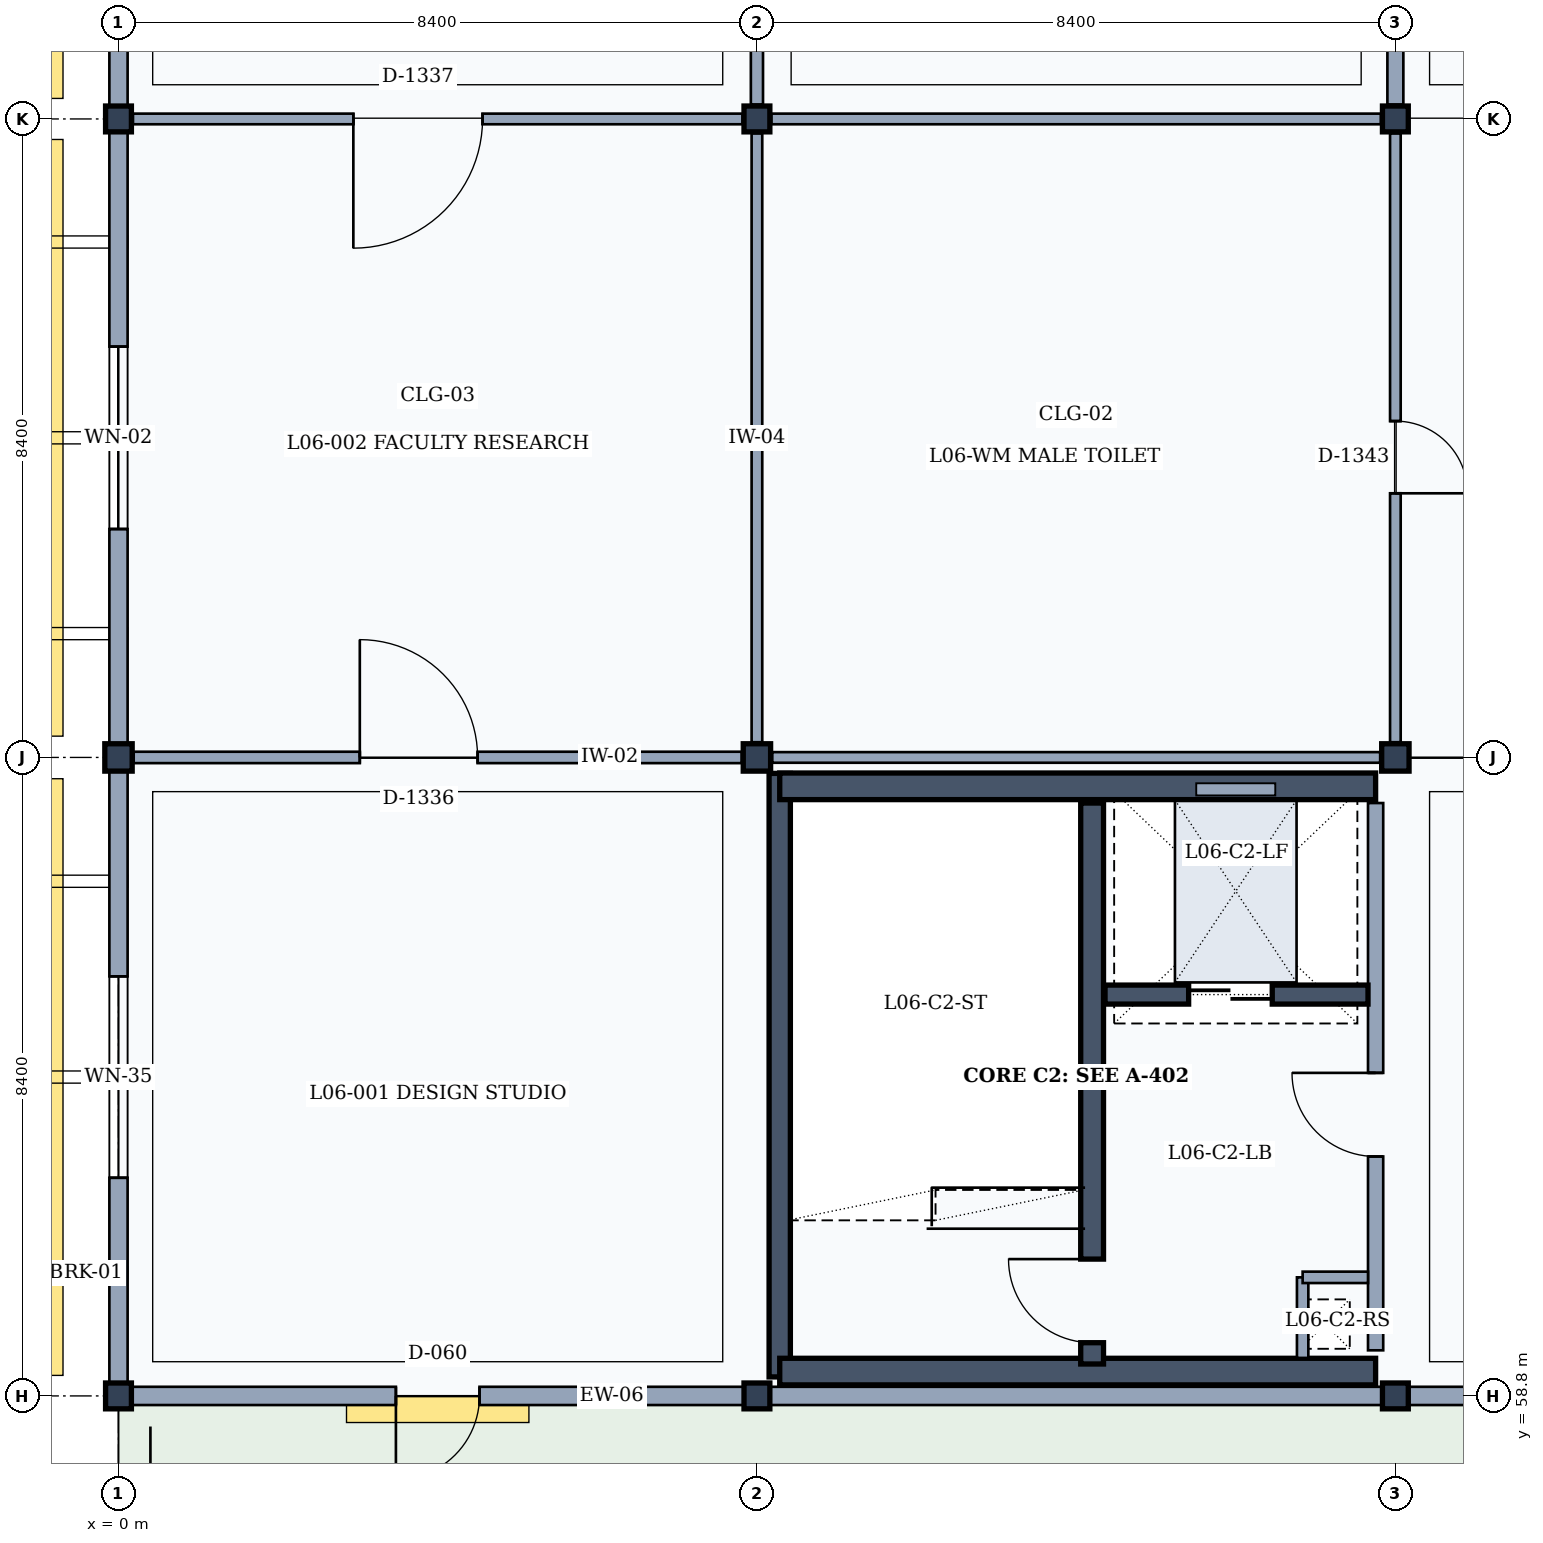
"""IFC4 building model, lengths in metres.
Left out: names, types, materials, properties, quantities, classifications, styles, units other than length and angle.
Written with IfcOpenShell. Run it as: python <this file> out.ifc"""

import sys

from ifc_helpers import new_model, si_unit, direction, frame, frame_2d, origin, origin_2d, place, context, subcontext, project, spatial, rectangle, extrude, element, fill, save


model = new_model("IFC4")
c1 = context("Model", 3, precision=1e-05, world=origin(), true_north=direction((0.0, 1.0)))
c2 = subcontext(c1, "Body", "Model", "MODEL_VIEW")
j1 = project(units=[si_unit("LENGTHUNIT", "METRE"), si_unit("PLANEANGLEUNIT", "RADIAN")], contexts=[c1])
p1 = place(None, origin())
s1 = spatial("IfcSite", under=j1, at=p1, CompositionType="ELEMENT")
p2 = place(p1, origin())
s2 = spatial("IfcBuilding", under=s1, at=p2, CompositionType="ELEMENT")
p3 = place(p2, frame((0.0, 0.0, 26.4)))
s3 = spatial("IfcBuildingStorey", under=s2, at=p3, CompositionType="ELEMENT", Elevation=26.4)
p4 = place(p3, frame((0.0, 58.8, 0.0), z_axis=(0.0, 0.0, 1.0), x_axis=(1.0, 0.0, 0.0)))
e1 = element("IfcColumn", 1, at=p4, inside=s3, PredefinedType="COLUMN", context=c2, shape_type="SweptSolid", body=[
    extrude(rectangle(XDim=0.34, YDim=0.34, at=origin_2d()), origin(), (0.0, 0.0, 1.0), 4.2),
])
p5 = place(p3, frame((0.0, 67.2, 0.0), z_axis=(0.0, 0.0, 1.0), x_axis=(1.0, 0.0, 0.0)))
e2 = element("IfcColumn", 2, at=p5, inside=s3, PredefinedType="COLUMN", context=c2, shape_type="SweptSolid", body=[
    extrude(rectangle(XDim=0.36, YDim=0.36, at=origin_2d()), origin(), (0.0, 0.0, 1.0), 4.2),
])
for number, where, z_axis, x_axis in (
    (3, (0.0, 75.6, 0.0), (0.0, 0.0, 1.0), (1.0, 0.0, 0.0)),
    (4, (8.4, 58.8, 0.0), (0.0, 0.0, 1.0), (1.0, 0.0, 0.0)),
):
    element("IfcColumn", number, at=place(p3, frame(where, z_axis=z_axis, x_axis=x_axis)), inside=s3, PredefinedType="COLUMN", context=c2, shape_type="SweptSolid", body=[
        extrude(rectangle(XDim=0.34, YDim=0.34, at=origin_2d()), origin(), (0.0, 0.0, 1.0), 4.2),
    ])
p6 = place(p3, frame((8.4, 67.2, 0.0), z_axis=(0.0, 0.0, 1.0), x_axis=(1.0, 0.0, 0.0)))
e5 = element("IfcColumn", 5, at=p6, inside=s3, PredefinedType="COLUMN", context=c2, shape_type="SweptSolid", body=[
    extrude(rectangle(XDim=0.36, YDim=0.36, at=origin_2d()), origin(), (0.0, 0.0, 1.0), 4.2),
])
for number, where, z_axis, x_axis in (
    (6, (8.4, 75.6, 0.0), (0.0, 0.0, 1.0), (1.0, 0.0, 0.0)),
    (7, (16.8, 58.8, 0.0), (0.0, 0.0, 1.0), (1.0, 0.0, 0.0)),
):
    element("IfcColumn", number, at=place(p3, frame(where, z_axis=z_axis, x_axis=x_axis)), inside=s3, PredefinedType="COLUMN", context=c2, shape_type="SweptSolid", body=[
        extrude(rectangle(XDim=0.34, YDim=0.34, at=origin_2d()), origin(), (0.0, 0.0, 1.0), 4.2),
    ])
p7 = place(p3, frame((16.8, 67.2, 0.0), z_axis=(0.0, 0.0, 1.0), x_axis=(1.0, 0.0, 0.0)))
e8 = element("IfcColumn", 8, at=p7, inside=s3, PredefinedType="COLUMN", context=c2, shape_type="SweptSolid", body=[
    extrude(rectangle(XDim=0.36, YDim=0.36, at=origin_2d()), origin(), (0.0, 0.0, 1.0), 4.2),
])
p8 = place(p3, frame((16.8, 75.6, 0.0), z_axis=(0.0, 0.0, 1.0), x_axis=(1.0, 0.0, 0.0)))
e9 = element("IfcColumn", 9, at=p8, inside=s3, PredefinedType="COLUMN", context=c2, shape_type="SweptSolid", body=[
    extrude(rectangle(XDim=0.34, YDim=0.34, at=origin_2d()), origin(), (0.0, 0.0, 1.0), 4.2),
])
p9 = place(p3, frame((8.23, 58.8, 0.0), z_axis=(0.0, 0.0, 1.0), x_axis=(-1.0, 0.0, 0.0)))
e10 = element("IfcWall", 10, at=p9, inside=s3, PredefinedType="SOLIDWALL", context=c2, shape_type="SweptSolid", body=[
    extrude(rectangle(XDim=8.06, YDim=0.24, at=frame_2d((4.03, 0.0))), origin(), (0.0, 0.0, 1.0), 3.36),
])
p10 = place(p9, frame((3.48, 0.0, 0.0)))
e11 = element("IfcOpeningElement", 11, at=p10, cuts=e10, PredefinedType="OPENING", context=c2, shape_type="SweptSolid", body=[
    extrude(rectangle(XDim=1.1, YDim=2.2, at=frame_2d((0.55, 1.1))), frame((0.0, 0.13, 0.0), z_axis=(0.0, -1.0, 0.0), x_axis=(1.0, 0.0, 0.0)), (0.0, 0.0, 1.0), 0.26),
])
p11 = place(p3, frame((0.0, 58.97, 0.0), z_axis=(0.0, 0.0, 1.0), x_axis=(0.0, 1.0, 0.0)))
e12 = element("IfcWall", 12, at=p11, inside=s3, PredefinedType="SOLIDWALL", context=c2, shape_type="SweptSolid", body=[
    extrude(rectangle(XDim=8.05, YDim=0.24, at=frame_2d((4.025, 0.0))), origin(), (0.0, 0.0, 1.0), 3.36),
])
p12 = place(p11, frame((2.7, 0.0, 0.9)))
e13 = element("IfcOpeningElement", 13, at=p12, cuts=e12, PredefinedType="OPENING", context=c2, shape_type="SweptSolid", body=[
    extrude(rectangle(XDim=2.65, YDim=1.8, at=frame_2d((1.325, 0.9))), frame((0.0, 0.13, 0.0), z_axis=(0.0, -1.0, 0.0), x_axis=(1.0, 0.0, 0.0)), (0.0, 0.0, 1.0), 0.26),
])
p13 = place(p3, frame((0.0, 67.38, 0.0), z_axis=(0.0, 0.0, 1.0), x_axis=(0.0, 1.0, 0.0)))
e14 = element("IfcWall", 14, at=p13, inside=s3, PredefinedType="SOLIDWALL", context=c2, shape_type="SweptSolid", body=[
    extrude(rectangle(XDim=8.05, YDim=0.24, at=frame_2d((4.025, 0.0))), origin(), (0.0, 0.0, 1.0), 3.36),
])
p14 = place(p13, frame((2.825, 0.0, 0.9)))
e15 = element("IfcOpeningElement", 15, at=p14, cuts=e14, PredefinedType="OPENING", context=c2, shape_type="SweptSolid", body=[
    extrude(rectangle(XDim=2.4, YDim=1.8, at=frame_2d((1.2, 0.9))), frame((0.0, 0.13, 0.0), z_axis=(0.0, -1.0, 0.0), x_axis=(1.0, 0.0, 0.0)), (0.0, 0.0, 1.0), 0.26),
])
p15 = place(p3, frame((0.0, 75.77, 0.0), z_axis=(0.0, 0.0, 1.0), x_axis=(0.0, 1.0, 0.0)))
e16 = element("IfcWall", 16, at=p15, inside=s3, PredefinedType="SOLIDWALL", context=c2, shape_type="SweptSolid", body=[
    extrude(rectangle(XDim=8.05, YDim=0.24, at=frame_2d((4.025, 0.0))), origin(), (0.0, 0.0, 1.0), 3.36),
])
p16 = place(p15, frame((3.125, 0.0, 0.9)))
e17 = element("IfcOpeningElement", 17, at=p16, cuts=e16, PredefinedType="OPENING", context=c2, shape_type="SweptSolid", body=[
    extrude(rectangle(XDim=1.8, YDim=1.5, at=frame_2d((0.9, 0.75))), frame((0.0, 0.13, 0.0), z_axis=(0.0, -1.0, 0.0), x_axis=(1.0, 0.0, 0.0)), (0.0, 0.0, 1.0), 0.26),
])
p17 = place(p3, frame((16.63, 58.8, 0.0), z_axis=(0.0, 0.0, 1.0), x_axis=(-1.0, 0.0, 0.0)))
e18 = element("IfcWall", 18, at=p17, inside=s3, PredefinedType="SOLIDWALL", context=c2, shape_type="SweptSolid", body=[
    extrude(rectangle(XDim=8.06, YDim=0.24, at=frame_2d((4.03, 0.0))), origin(), (0.0, 0.0, 1.0), 3.36),
])
p18 = place(p3, frame((25.03, 58.8, 0.0), z_axis=(0.0, 0.0, 1.0), x_axis=(-1.0, 0.0, 0.0)))
e19 = element("IfcWall", 19, at=p18, inside=s3, PredefinedType="SOLIDWALL", context=c2, shape_type="SweptSolid", body=[
    extrude(rectangle(XDim=8.06, YDim=0.24, at=frame_2d((4.03, 0.0))), origin(), (0.0, 0.0, 1.0), 3.36),
])
p19 = place(p18, frame((3.48, 0.0, 0.0)))
e20 = element("IfcOpeningElement", 20, at=p19, cuts=e19, PredefinedType="OPENING", context=c2, shape_type="SweptSolid", body=[
    extrude(rectangle(XDim=1.1, YDim=2.2, at=frame_2d((0.55, 1.1))), frame((0.0, 0.13, 0.0), z_axis=(0.0, -1.0, 0.0), x_axis=(1.0, 0.0, 0.0)), (0.0, 0.0, 1.0), 0.26),
])
p20 = place(p3, frame((8.7, 59.05, 0.0), z_axis=(0.0, 0.0, 1.0), x_axis=(0.0, 1.0, 0.0)))
e21 = element("IfcWall", 21, at=p20, inside=s3, PredefinedType="SHEAR", context=c2, shape_type="SweptSolid", body=[
    extrude(rectangle(XDim=7.94, YDim=0.28, at=frame_2d((3.97, 0.0))), origin(), (0.0, 0.0, 1.0), 3.99),
])
p21 = place(p3, frame((8.7, 66.82, 0.0), z_axis=(0.0, 0.0, 1.0), x_axis=(1.0, 0.0, 0.0)))
e22 = element("IfcWall", 22, at=p21, inside=s3, PredefinedType="SHEAR", context=c2, shape_type="SweptSolid", body=[
    extrude(rectangle(XDim=7.84, YDim=0.35, at=frame_2d((3.92, 0.0))), origin(), (0.0, 0.0, 1.0), 3.99),
])
p22 = place(p3, frame((16.54, 66.6, 0.0), z_axis=(0.0, 0.0, 1.0), x_axis=(0.0, -1.0, 0.0)))
e23 = element("IfcWall", 23, at=p22, inside=s3, PredefinedType="PARTITIONING", context=c2, shape_type="SweptSolid", body=[
    extrude(rectangle(XDim=7.2, YDim=0.2, at=frame_2d((3.6, 0.0))), origin(), (0.0, 0.0, 1.0), 3.32),
])
p23 = place(p22, frame((3.55, 0.0, 0.0)))
e24 = element("IfcOpeningElement", 24, at=p23, cuts=e23, PredefinedType="OPENING", context=c2, shape_type="SweptSolid", body=[
    extrude(rectangle(XDim=1.1, YDim=2.15, at=frame_2d((0.55, 1.075))), frame((0.0, 0.11, 0.0), z_axis=(0.0, -1.0, 0.0), x_axis=(1.0, 0.0, 0.0)), (0.0, 0.0, 1.0), 0.22),
])
p24 = place(p3, frame((16.54, 59.12, 0.0), z_axis=(0.0, 0.0, 1.0), x_axis=(-1.0, 0.0, 0.0)))
e25 = element("IfcWall", 25, at=p24, inside=s3, PredefinedType="SHEAR", context=c2, shape_type="SweptSolid", body=[
    extrude(rectangle(XDim=7.84, YDim=0.35, at=frame_2d((3.92, 0.0))), origin(), (0.0, 0.0, 1.0), 3.99),
])
p25 = place(p3, frame((12.81, 59.22, 0.0), z_axis=(0.0, 0.0, 1.0), x_axis=(0.0, 1.0, 0.0)))
e26 = element("IfcWall", 26, at=p25, inside=s3, PredefinedType="SHEAR", context=c2, shape_type="SweptSolid", body=[
    extrude(rectangle(XDim=7.38, YDim=0.3, at=frame_2d((3.69, 0.0))), origin(), (0.0, 0.0, 1.0), 3.99),
])
p26 = place(p25, frame((0.28, 0.0, 0.0)))
e27 = element("IfcOpeningElement", 27, at=p26, cuts=e26, PredefinedType="OPENING", context=c2, shape_type="SweptSolid", body=[
    extrude(rectangle(XDim=1.1, YDim=2.15, at=frame_2d((0.55, 1.075))), frame((0.0, 0.16, 0.0), z_axis=(0.0, -1.0, 0.0), x_axis=(1.0, 0.0, 0.0)), (0.0, 0.0, 1.0), 0.32),
])
p27 = place(p3, frame((15.58, 60.36, 0.0), z_axis=(0.0, 0.0, 1.0), x_axis=(0.0, -1.0, 0.0)))
e28 = element("IfcWall", 28, at=p27, inside=s3, PredefinedType="PARTITIONING", context=c2, shape_type="SweptSolid", body=[
    extrude(rectangle(XDim=1.06, YDim=0.15, at=frame_2d((0.53, 0.0))), origin(), (0.0, 0.0, 1.0), 3.32),
])
p28 = place(p3, frame((15.58, 60.36, 0.0), z_axis=(0.0, 0.0, 1.0), x_axis=(1.0, 0.0, 0.0)))
e29 = element("IfcWall", 29, at=p28, inside=s3, PredefinedType="PARTITIONING", context=c2, shape_type="SweptSolid", body=[
    extrude(rectangle(XDim=0.86, YDim=0.15, at=frame_2d((0.43, 0.0))), origin(), (0.0, 0.0, 1.0), 3.32),
])
p29 = place(p3, frame((12.98, 64.08, 0.0), z_axis=(0.0, 0.0, 1.0), x_axis=(1.0, 0.0, 0.0)))
e30 = element("IfcWall", 30, at=p29, inside=s3, PredefinedType="SHEAR", context=c2, shape_type="SweptSolid", body=[
    extrude(rectangle(XDim=3.46, YDim=0.25, at=frame_2d((1.73, 0.0))), origin(), (0.0, 0.0, 1.0), 3.99),
])
p30 = place(p29, frame((1.1, 0.0, 0.0)))
e31 = element("IfcOpeningElement", 31, at=p30, cuts=e30, PredefinedType="OPENING", context=c2, shape_type="SweptSolid", body=[
    extrude(rectangle(XDim=1.1, YDim=2.15, at=frame_2d((0.55, 1.075))), frame((0.0, 0.135, 0.0), z_axis=(0.0, -1.0, 0.0), x_axis=(1.0, 0.0, 0.0)), (0.0, 0.0, 1.0), 0.27),
])
p31 = place(p3, frame((0.2, 67.2, 0.0), z_axis=(0.0, 0.0, 1.0), x_axis=(1.0, 0.0, 0.0)))
e32 = element("IfcWall", 32, at=p31, inside=s3, PredefinedType="PARTITIONING", context=c2, shape_type="SweptSolid", body=[
    extrude(rectangle(XDim=8.0, YDim=0.15, at=frame_2d((4.0, 0.0))), origin(), (0.0, 0.0, 1.0), 3.32),
])
p32 = place(p31, frame((2.975, 0.0, 0.0)))
e33 = element("IfcOpeningElement", 33, at=p32, cuts=e32, PredefinedType="OPENING", context=c2, shape_type="SweptSolid", body=[
    extrude(rectangle(XDim=1.55, YDim=2.35, at=frame_2d((0.775, 1.175))), frame((0.0, 0.085, 0.0), z_axis=(0.0, -1.0, 0.0), x_axis=(1.0, 0.0, 0.0)), (0.0, 0.0, 1.0), 0.17),
])
p33 = place(p3, frame((8.4, 67.4, 0.0), z_axis=(0.0, 0.0, 1.0), x_axis=(0.0, 1.0, 0.0)))
e34 = element("IfcWall", 34, at=p33, inside=s3, PredefinedType="PARTITIONING", context=c2, shape_type="SweptSolid", body=[
    extrude(rectangle(XDim=8.01, YDim=0.14, at=frame_2d((4.005, 0.0))), origin(), (0.0, 0.0, 1.0), 3.32),
])
p34 = place(p3, frame((0.19, 75.6, 0.0), z_axis=(0.0, 0.0, 1.0), x_axis=(1.0, 0.0, 0.0)))
e35 = element("IfcWall", 35, at=p34, inside=s3, PredefinedType="PARTITIONING", context=c2, shape_type="SweptSolid", body=[
    extrude(rectangle(XDim=8.02, YDim=0.14, at=frame_2d((4.01, 0.0))), origin(), (0.0, 0.0, 1.0), 3.32),
])
p35 = place(p34, frame((2.9, 0.0, 0.0)))
e36 = element("IfcOpeningElement", 36, at=p35, cuts=e35, PredefinedType="OPENING", context=c2, shape_type="SweptSolid", body=[
    extrude(rectangle(XDim=1.7, YDim=2.3, at=frame_2d((0.85, 1.15))), frame((0.0, 0.08, 0.0), z_axis=(0.0, -1.0, 0.0), x_axis=(1.0, 0.0, 0.0)), (0.0, 0.0, 1.0), 0.16),
])
p36 = place(p3, frame((8.4, 75.79, 0.0), z_axis=(0.0, 0.0, 1.0), x_axis=(0.0, 1.0, 0.0)))
e37 = element("IfcWall", 37, at=p36, inside=s3, PredefinedType="PARTITIONING", context=c2, shape_type="SweptSolid", body=[
    extrude(rectangle(XDim=8.01, YDim=0.16, at=frame_2d((4.005, 0.0))), origin(), (0.0, 0.0, 1.0), 3.32),
])
p37 = place(p36, frame((2.8, 0.0, 0.0)))
e38 = element("IfcOpeningElement", 38, at=p37, cuts=e37, PredefinedType="OPENING", context=c2, shape_type="SweptSolid", body=[
    extrude(rectangle(XDim=1.9, YDim=2.4, at=frame_2d((0.95, 1.2))), frame((0.0, 0.09, 0.0), z_axis=(0.0, -1.0, 0.0), x_axis=(1.0, 0.0, 0.0)), (0.0, 0.0, 1.0), 0.18),
])
p38 = place(p3, frame((8.6, 67.2, 0.0), z_axis=(0.0, 0.0, 1.0), x_axis=(1.0, 0.0, 0.0)))
e39 = element("IfcWall", 39, at=p38, inside=s3, PredefinedType="PARTITIONING", context=c2, shape_type="SweptSolid", body=[
    extrude(rectangle(XDim=8.0, YDim=0.14, at=frame_2d((4.0, 0.0))), origin(), (0.0, 0.0, 1.0), 3.32),
])
p39 = place(p3, frame((16.8, 67.4, 0.0), z_axis=(0.0, 0.0, 1.0), x_axis=(0.0, 1.0, 0.0)))
e40 = element("IfcWall", 40, at=p39, inside=s3, PredefinedType="PARTITIONING", context=c2, shape_type="SweptSolid", body=[
    extrude(rectangle(XDim=8.01, YDim=0.14, at=frame_2d((4.005, 0.0))), origin(), (0.0, 0.0, 1.0), 3.32),
])
p40 = place(p39, frame((3.275, 0.0, 0.0)))
e41 = element("IfcOpeningElement", 41, at=p40, cuts=e40, PredefinedType="OPENING", context=c2, shape_type="SweptSolid", body=[
    extrude(rectangle(XDim=0.95, YDim=2.15, at=frame_2d((0.475, 1.075))), frame((0.0, 0.08, 0.0), z_axis=(0.0, -1.0, 0.0), x_axis=(1.0, 0.0, 0.0)), (0.0, 0.0, 1.0), 0.16),
])
p41 = place(p3, frame((8.59, 75.6, 0.0), z_axis=(0.0, 0.0, 1.0), x_axis=(1.0, 0.0, 0.0)))
e42 = element("IfcWall", 42, at=p41, inside=s3, PredefinedType="PARTITIONING", context=c2, shape_type="SweptSolid", body=[
    extrude(rectangle(XDim=8.02, YDim=0.14, at=frame_2d((4.01, 0.0))), origin(), (0.0, 0.0, 1.0), 3.32),
])
p42 = place(p3, frame((16.8, 75.79, 0.0), z_axis=(0.0, 0.0, 1.0), x_axis=(0.0, 1.0, 0.0)))
e43 = element("IfcWall", 43, at=p42, inside=s3, PredefinedType="PARTITIONING", context=c2, shape_type="SweptSolid", body=[
    extrude(rectangle(XDim=8.01, YDim=0.21, at=frame_2d((4.005, 0.0))), origin(), (0.0, 0.0, 1.0), 3.32),
])
p43 = place(p42, frame((3.275, 0.0, 0.0)))
e44 = element("IfcOpeningElement", 44, at=p43, cuts=e43, PredefinedType="OPENING", context=c2, shape_type="SweptSolid", body=[
    extrude(rectangle(XDim=0.95, YDim=2.15, at=frame_2d((0.475, 1.075))), frame((0.0, 0.115, 0.0), z_axis=(0.0, -1.0, 0.0), x_axis=(1.0, 0.0, 0.0)), (0.0, 0.0, 1.0), 0.23),
])
p44 = place(p10, origin())
e45 = element("IfcDoor", 45, at=p44, inside=s3, OperationType="SINGLE_SWING_RIGHT", PredefinedType="DOOR", context=c2, shape_type="SweptSolid", body=[
    extrude(rectangle(XDim=1.1, YDim=2.2, at=frame_2d((0.55, 1.1))), frame((0.0, 0.025, 0.0), z_axis=(0.0, -1.0, 0.0), x_axis=(1.0, 0.0, 0.0)), (0.0, 0.0, 1.0), 0.05),
])
fill(e11, e45)
p45 = place(p12, origin())
e46 = element("IfcWindow", 46, at=p45, inside=s3, PartitioningType="SINGLE_PANEL", PredefinedType="WINDOW", context=c2, shape_type="SweptSolid", body=[
    extrude(rectangle(XDim=2.65, YDim=1.8, at=frame_2d((1.325, 0.9))), frame((0.0, 0.03, 0.0), z_axis=(0.0, -1.0, 0.0), x_axis=(1.0, 0.0, 0.0)), (0.0, 0.0, 1.0), 0.06),
])
fill(e13, e46)
p46 = place(p14, origin())
e47 = element("IfcWindow", 47, at=p46, inside=s3, PartitioningType="SINGLE_PANEL", PredefinedType="WINDOW", context=c2, shape_type="SweptSolid", body=[
    extrude(rectangle(XDim=2.4, YDim=1.8, at=frame_2d((1.2, 0.9))), frame((0.0, 0.03, 0.0), z_axis=(0.0, -1.0, 0.0), x_axis=(1.0, 0.0, 0.0)), (0.0, 0.0, 1.0), 0.06),
])
fill(e15, e47)
p47 = place(p23, frame((1.1, 0.0, 0.0), z_axis=(0.0, 0.0, 1.0), x_axis=(-1.0, 0.0, 0.0)))
e48 = element("IfcDoor", 48, at=p47, inside=s3, OperationType="SINGLE_SWING_RIGHT", PredefinedType="DOOR", context=c2, shape_type="SweptSolid", body=[
    extrude(rectangle(XDim=1.1, YDim=2.15, at=frame_2d((0.55, 1.075))), frame((0.0, 0.025, 0.0), z_axis=(0.0, -1.0, 0.0), x_axis=(1.0, 0.0, 0.0)), (0.0, 0.0, 1.0), 0.05),
])
fill(e24, e48)
p48 = place(p26, origin())
e49 = element("IfcDoor", 49, at=p48, inside=s3, OperationType="SINGLE_SWING_RIGHT", PredefinedType="DOOR", context=c2, shape_type="SweptSolid", body=[
    extrude(rectangle(XDim=1.1, YDim=2.15, at=frame_2d((0.55, 1.075))), frame((0.0, 0.025, 0.0), z_axis=(0.0, -1.0, 0.0), x_axis=(1.0, 0.0, 0.0)), (0.0, 0.0, 1.0), 0.05),
])
fill(e27, e49)
p49 = place(p30, origin())
e50 = element("IfcDoor", 50, at=p49, inside=s3, OperationType="DOUBLE_DOOR_SLIDING", PredefinedType="DOOR", context=c2, shape_type="SweptSolid", body=[
    extrude(rectangle(XDim=1.1, YDim=2.15, at=frame_2d((0.55, 1.075))), frame((0.0, 0.025, 0.0), z_axis=(0.0, -1.0, 0.0), x_axis=(1.0, 0.0, 0.0)), (0.0, 0.0, 1.0), 0.05),
])
fill(e31, e50)
p50 = place(p32, origin())
e51 = element("IfcDoor", 51, at=p50, inside=s3, OperationType="SINGLE_SWING_LEFT", PredefinedType="DOOR", context=c2, shape_type="SweptSolid", body=[
    extrude(rectangle(XDim=1.55, YDim=2.35, at=frame_2d((0.775, 1.175))), frame((0.0, 0.025, 0.0), z_axis=(0.0, -1.0, 0.0), x_axis=(1.0, 0.0, 0.0)), (0.0, 0.0, 1.0), 0.05),
])
fill(e33, e51)
p51 = place(p35, frame((1.7, 0.0, 0.0), z_axis=(0.0, 0.0, 1.0), x_axis=(-1.0, 0.0, 0.0)))
e52 = element("IfcDoor", 52, at=p51, inside=s3, OperationType="SINGLE_SWING_RIGHT", PredefinedType="DOOR", context=c2, shape_type="SweptSolid", body=[
    extrude(rectangle(XDim=1.7, YDim=2.3, at=frame_2d((0.85, 1.15))), frame((0.0, 0.025, 0.0), z_axis=(0.0, -1.0, 0.0), x_axis=(1.0, 0.0, 0.0)), (0.0, 0.0, 1.0), 0.05),
])
fill(e36, e52)
p52 = place(p40, frame((0.95, 0.0, 0.0), z_axis=(0.0, 0.0, 1.0), x_axis=(-1.0, 0.0, 0.0)))
e53 = element("IfcDoor", 53, at=p52, inside=s3, OperationType="SINGLE_SWING_RIGHT", PredefinedType="DOOR", context=c2, shape_type="SweptSolid", body=[
    extrude(rectangle(XDim=0.95, YDim=2.15, at=frame_2d((0.475, 1.075))), frame((0.0, 0.025, 0.0), z_axis=(0.0, -1.0, 0.0), x_axis=(1.0, 0.0, 0.0)), (0.0, 0.0, 1.0), 0.05),
])
fill(e41, e53)
save(model, sys.argv[1])
